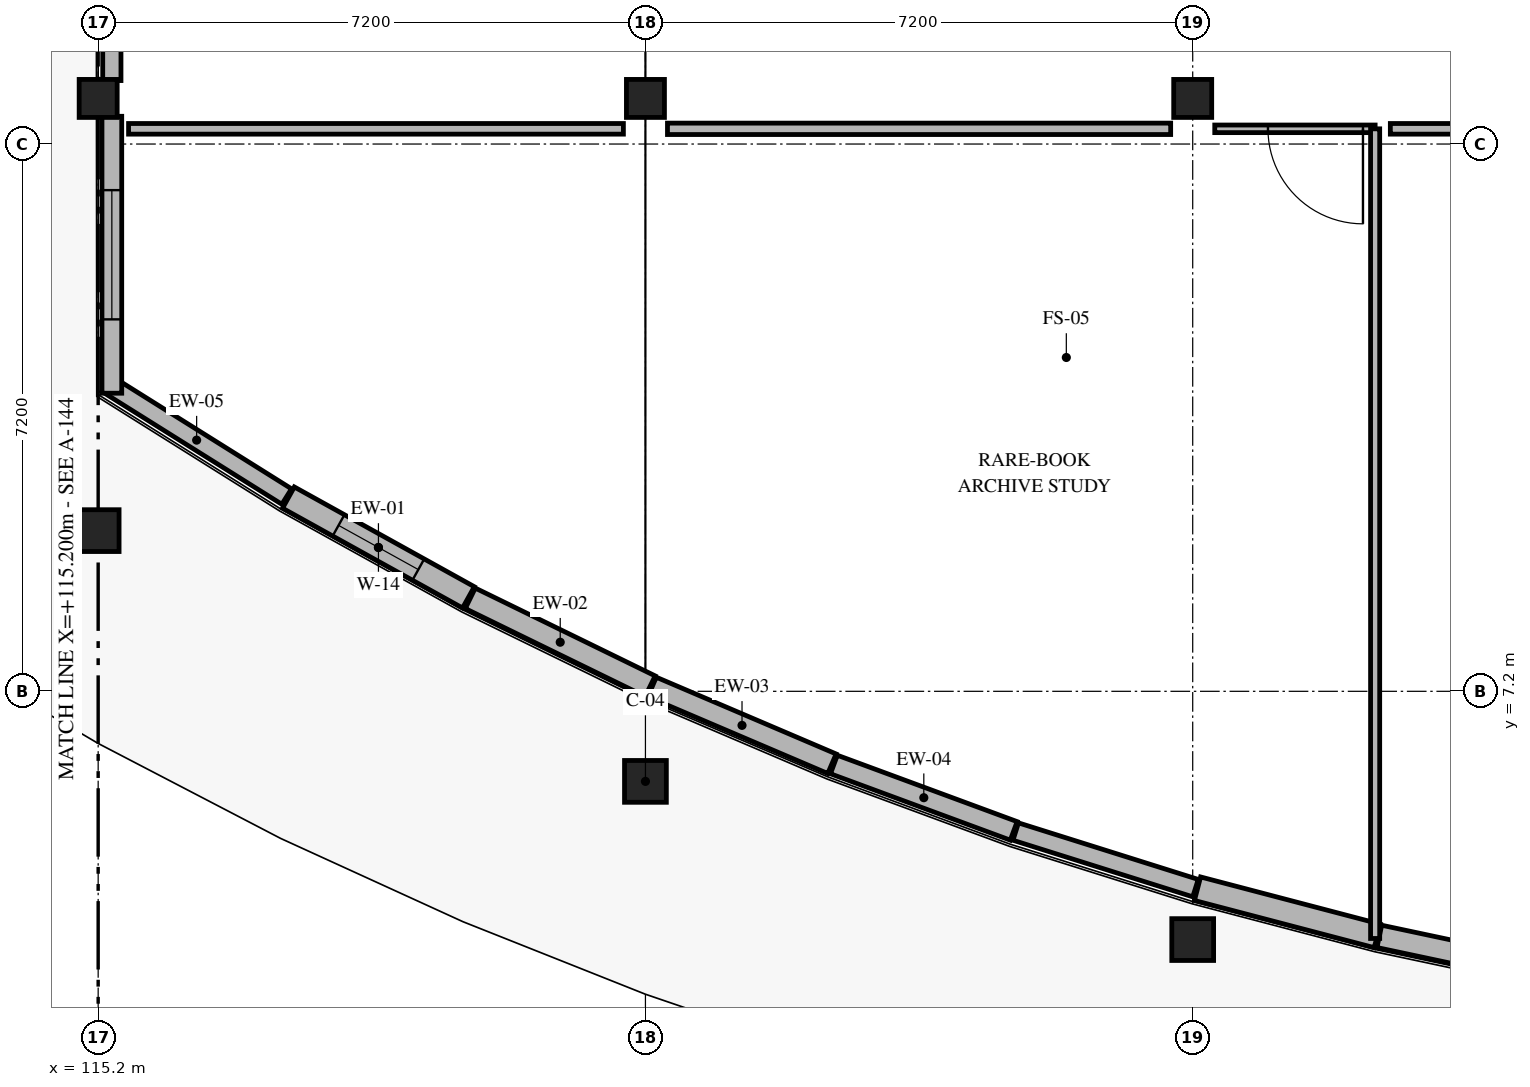
"""IFC4 building model, lengths in metres.
Left out: names, types, materials, properties, quantities, classifications, styles, units other than length and angle.
Written with IfcOpenShell. Run it as: python <this file> out.ifc"""

import sys

from ifc_helpers import new_model, si_unit, direction, frame, frame_2d, origin, origin_2d, place, context, subcontext, project, spatial, rectangle, extrude, element, fill, save


model = new_model("IFC4")
c1 = context("Model", 3, precision=1e-05, world=origin(), true_north=direction((0.0, 1.0)))
c2 = subcontext(c1, "Body", "Model", "MODEL_VIEW")
j1 = project(units=[si_unit("LENGTHUNIT", "METRE"), si_unit("PLANEANGLEUNIT", "RADIAN")], contexts=[c1])
p1 = place(None, origin())
s1 = spatial("IfcSite", under=j1, at=p1, CompositionType="ELEMENT")
p2 = place(p1, origin())
s2 = spatial("IfcBuilding", under=s1, at=p2, CompositionType="ELEMENT")
p3 = place(p2, frame((0.0, 0.0, 20.7)))
s3 = spatial("IfcBuildingStorey", under=s2, at=p3, CompositionType="ELEMENT", Elevation=20.7)
p4 = place(p3, frame((115.2, 9.314, 0.0), z_axis=(0.0, 0.0, 1.0), x_axis=(1.0, 0.0, 0.0)))
e1 = element("IfcColumn", 1, at=p4, inside=s3, PredefinedType="COLUMN", context=c2, shape_type="SweptSolid", body=[
    extrude(rectangle(XDim=0.55, YDim=0.55, at=origin_2d()), origin(), (0.0, 0.0, 1.0), 3.9),
])
p5 = place(p3, frame((115.2, 15.0, 0.0), z_axis=(0.0, 0.0, 1.0), x_axis=(1.0, 0.0, 0.0)))
e2 = element("IfcColumn", 2, at=p5, inside=s3, PredefinedType="COLUMN", context=c2, shape_type="SweptSolid", body=[
    extrude(rectangle(XDim=0.5, YDim=0.5, at=origin_2d()), origin(), (0.0, 0.0, 1.0), 3.9),
])
p6 = place(p3, frame((122.4, 6.015, 0.0), z_axis=(0.0, 0.0, 1.0), x_axis=(1.0, 0.0, 0.0)))
e3 = element("IfcColumn", 3, at=p6, inside=s3, PredefinedType="COLUMN", context=c2, shape_type="SweptSolid", body=[
    extrude(rectangle(XDim=0.55, YDim=0.55, at=origin_2d()), origin(), (0.0, 0.0, 1.0), 3.9),
])
p7 = place(p3, frame((122.4, 15.0, 0.0), z_axis=(0.0, 0.0, 1.0), x_axis=(1.0, 0.0, 0.0)))
e4 = element("IfcColumn", 4, at=p7, inside=s3, PredefinedType="COLUMN", context=c2, shape_type="SweptSolid", body=[
    extrude(rectangle(XDim=0.5, YDim=0.5, at=origin_2d()), origin(), (0.0, 0.0, 1.0), 3.9),
])
p8 = place(p3, frame((129.6, 3.934, 0.0), z_axis=(0.0, 0.0, 1.0), x_axis=(1.0, 0.0, 0.0)))
e5 = element("IfcColumn", 5, at=p8, inside=s3, PredefinedType="COLUMN", context=c2, shape_type="SweptSolid", body=[
    extrude(rectangle(XDim=0.55, YDim=0.55, at=origin_2d()), origin(), (0.0, 0.0, 1.0), 3.9),
])
p9 = place(p3, frame((129.6, 15.0, 0.0), z_axis=(0.0, 0.0, 1.0), x_axis=(1.0, 0.0, 0.0)))
e6 = element("IfcColumn", 6, at=p9, inside=s3, PredefinedType="COLUMN", context=c2, shape_type="SweptSolid", body=[
    extrude(rectangle(XDim=0.5, YDim=0.5, at=origin_2d()), origin(), (0.0, 0.0, 1.0), 3.9),
])
p10 = place(p3, frame((117.68, 9.762, 0.0), z_axis=(0.0, 0.0, 1.0), x_axis=(-0.847458290903, 0.530861983174, 0.0)))
e7 = element("IfcWall", 7, at=p10, inside=s3, PredefinedType="SOLIDWALL", context=c2, shape_type="SweptSolid", body=[
    extrude(rectangle(XDim=2.796, YDim=0.24, at=frame_2d((1.398, 0.0))), origin(), (0.0, 0.0, 1.0), 2.86),
])
p11 = place(p3, frame((120.072, 8.436, 0.0), z_axis=(0.0, 0.0, 1.0), x_axis=(-0.874616129919, 0.484816073666, 0.0)))
e8 = element("IfcWall", 8, at=p11, inside=s3, PredefinedType="SOLIDWALL", context=c2, shape_type="SweptSolid", body=[
    extrude(rectangle(XDim=2.708, YDim=0.32, at=frame_2d((1.354, 0.0))), origin(), (0.0, 0.0, 1.0), 3.06),
])
p12 = place(p11, frame((0.754, 0.0, 0.75)))
e9 = element("IfcOpeningElement", 9, at=p12, cuts=e8, PredefinedType="OPENING", context=c2, shape_type="SweptSolid", body=[
    extrude(rectangle(XDim=1.2, YDim=1.5, at=frame_2d((0.6, 0.75))), frame((0.0, 0.17, 0.0), z_axis=(0.0, -1.0, 0.0), x_axis=(1.0, 0.0, 0.0)), (0.0, 0.0, 1.0), 0.34),
])
p13 = place(p3, frame((122.463, 7.268, 0.0), z_axis=(0.0, 0.0, 1.0), x_axis=(-0.898667775588, 0.438629945535, 0.0)))
e10 = element("IfcWall", 10, at=p13, inside=s3, PredefinedType="SOLIDWALL", context=c2, shape_type="SweptSolid", body=[
    extrude(rectangle(XDim=2.634, YDim=0.3, at=frame_2d((1.317, 0.0))), origin(), (0.0, 0.0, 1.0), 2.96),
])
p14 = place(p3, frame((124.854, 6.247, 0.0), z_axis=(0.0, 0.0, 1.0), x_axis=(-0.919781821174, 0.392430123001, 0.0)))
e11 = element("IfcWall", 11, at=p14, inside=s3, PredefinedType="SOLIDWALL", context=c2, shape_type="SweptSolid", body=[
    extrude(rectangle(XDim=2.573, YDim=0.28, at=frame_2d((1.287, 0.0))), origin(), (0.0, 0.0, 1.0), 2.96),
])
p15 = place(p3, frame((127.245, 5.364, 0.0), z_axis=(0.0, 0.0, 1.0), x_axis=(-0.938146303957, 0.346239097117, 0.0)))
e12 = element("IfcWall", 12, at=p15, inside=s3, PredefinedType="SOLIDWALL", context=c2, shape_type="SweptSolid", body=[
    extrude(rectangle(XDim=2.522, YDim=0.26, at=frame_2d((1.261, 0.0))), origin(), (0.0, 0.0, 1.0), 3.06),
])
p16 = place(p3, frame((129.637, 4.611, 0.0), z_axis=(0.0, 0.0, 1.0), x_axis=(-0.953884231724, 0.30017473656, 0.0)))
e13 = element("IfcWall", 13, at=p16, inside=s3, PredefinedType="SOLIDWALL", context=c2, shape_type="SweptSolid", body=[
    extrude(rectangle(XDim=2.48, YDim=0.24, at=frame_2d((1.24, 0.0))), origin(), (0.0, 0.0, 1.0), 3.01),
])
p17 = place(p3, frame((132.028, 3.982, 0.0), z_axis=(0.0, 0.0, 1.0), x_axis=(-0.967257930518, 0.253795381852, 0.0)))
e14 = element("IfcWall", 14, at=p17, inside=s3, PredefinedType="SOLIDWALL", context=c2, shape_type="SweptSolid", body=[
    extrude(rectangle(XDim=2.445, YDim=0.32, at=frame_2d((1.223, 0.0))), origin(), (0.0, 0.0, 1.0), 3.01),
])
p18 = place(p3, frame((134.42, 3.474, 0.0), z_axis=(0.0, 0.0, 1.0), x_axis=(-0.978189380311, 0.207715036162, 0.0)))
e15 = element("IfcWall", 15, at=p18, inside=s3, PredefinedType="SOLIDWALL", context=c2, shape_type="SweptSolid", body=[
    extrude(rectangle(XDim=2.418, YDim=0.3, at=frame_2d((1.209, 0.0))), origin(), (0.0, 0.0, 1.0), 3.06),
])
p19 = place(p3, frame((115.38, 11.122, 0.0), z_axis=(0.0, 0.0, 1.0), x_axis=(0.0, 1.0, 0.0)))
e16 = element("IfcWall", 16, at=p19, inside=s3, PredefinedType="SOLIDWALL", context=c2, shape_type="SweptSolid", body=[
    extrude(rectangle(XDim=3.643, YDim=0.26, at=frame_2d((1.822, 0.0))), origin(), (0.0, 0.0, 1.0), 2.86),
])
p20 = place(p19, frame((0.972, 0.0, 0.9)))
e17 = element("IfcOpeningElement", 17, at=p20, cuts=e16, PredefinedType="OPENING", context=c2, shape_type="SweptSolid", body=[
    extrude(rectangle(XDim=1.7, YDim=0.85, at=frame_2d((0.85, 0.425))), frame((0.0, 0.14, 0.0), z_axis=(0.0, -1.0, 0.0), x_axis=(1.0, 0.0, 0.0)), (0.0, 0.0, 1.0), 0.28),
])
p21 = place(p3, frame((115.38, 15.235, 0.0), z_axis=(0.0, 0.0, 1.0), x_axis=(0.0, 1.0, 0.0)))
e18 = element("IfcWall", 18, at=p21, inside=s3, PredefinedType="SOLIDWALL", context=c2, shape_type="SweptSolid", body=[
    extrude(rectangle(XDim=6.93, YDim=0.24, at=frame_2d((3.465, 0.0))), origin(), (0.0, 0.0, 1.0), 2.86),
])
p22 = place(p21, frame((2.465, 0.0, 0.9)))
e19 = element("IfcOpeningElement", 19, at=p22, cuts=e18, PredefinedType="OPENING", context=c2, shape_type="SweptSolid", body=[
    extrude(rectangle(XDim=2.0, YDim=0.85, at=frame_2d((1.0, 0.425))), frame((0.0, 0.13, 0.0), z_axis=(0.0, -1.0, 0.0), x_axis=(1.0, 0.0, 0.0)), (0.0, 0.0, 1.0), 0.26),
])
p23 = place(p3, frame((132.0, 14.6, 0.0), z_axis=(0.0, 0.0, 1.0), x_axis=(-1.0, 0.0, 0.0)))
e20 = element("IfcWall", 20, at=p23, inside=s3, PredefinedType="PARTITIONING", context=c2, shape_type="SweptSolid", body=[
    extrude(rectangle(XDim=2.11, YDim=0.1, at=frame_2d((1.055, 0.0))), origin(), (0.0, 0.0, 1.0), 3.66),
])
p24 = place(p23, frame((0.16, 0.0, 0.0)))
e21 = element("IfcOpeningElement", 21, at=p24, cuts=e20, PredefinedType="OPENING", context=c2, shape_type="SweptSolid", body=[
    extrude(rectangle(XDim=1.25, YDim=2.2, at=frame_2d((0.625, 1.1))), frame((0.0, 0.06, 0.0), z_axis=(0.0, -1.0, 0.0), x_axis=(1.0, 0.0, 0.0)), (0.0, 0.0, 1.0), 0.12),
])
p25 = place(p3, frame((129.31, 14.6, 0.0), z_axis=(0.0, 0.0, 1.0), x_axis=(-1.0, 0.0, 0.0)))
e22 = element("IfcWall", 22, at=p25, inside=s3, PredefinedType="PARTITIONING", context=c2, shape_type="SweptSolid", body=[
    extrude(rectangle(XDim=6.62, YDim=0.15, at=frame_2d((3.31, 0.0))), origin(), (0.0, 0.0, 1.0), 3.66),
])
p26 = place(p3, frame((122.11, 14.6, 0.0), z_axis=(0.0, 0.0, 1.0), x_axis=(-1.0, 0.0, 0.0)))
e23 = element("IfcWall", 23, at=p26, inside=s3, PredefinedType="PARTITIONING", context=c2, shape_type="SweptSolid", body=[
    extrude(rectangle(XDim=6.51, YDim=0.14, at=frame_2d((3.255, 0.0))), origin(), (0.0, 0.0, 1.0), 3.66),
])
p27 = place(p3, frame((132.0, 3.948, 0.0), z_axis=(0.0, 0.0, 1.0), x_axis=(0.0, 1.0, 0.0)))
e24 = element("IfcWall", 24, at=p27, inside=s3, PredefinedType="PARTITIONING", context=c2, shape_type="SweptSolid", body=[
    extrude(rectangle(XDim=10.652, YDim=0.12, at=frame_2d((5.326, 0.0))), origin(), (0.0, 0.0, 1.0), 3.06),
])
p28 = place(p3, frame((136.51, 14.6, 0.0), z_axis=(0.0, 0.0, 1.0), x_axis=(-1.0, 0.0, 0.0)))
e25 = element("IfcWall", 25, at=p28, inside=s3, PredefinedType="PARTITIONING", context=c2, shape_type="SweptSolid", body=[
    extrude(rectangle(XDim=4.31, YDim=0.14, at=frame_2d((2.155, 0.0))), origin(), (0.0, 0.0, 1.0), 3.66),
])
p29 = place(p12, origin())
e26 = element("IfcWindow", 26, at=p29, inside=s3, PartitioningType="SINGLE_PANEL", PredefinedType="WINDOW", context=c2, shape_type="SweptSolid", body=[
    extrude(rectangle(XDim=1.2, YDim=1.5, at=frame_2d((0.6, 0.75))), frame((0.0, 0.03, 0.0), z_axis=(0.0, -1.0, 0.0), x_axis=(1.0, 0.0, 0.0)), (0.0, 0.0, 1.0), 0.06),
])
fill(e9, e26)
p30 = place(p20, origin())
e27 = element("IfcWindow", 27, at=p30, inside=s3, PartitioningType="SINGLE_PANEL", PredefinedType="WINDOW", context=c2, shape_type="SweptSolid", body=[
    extrude(rectangle(XDim=1.7, YDim=0.85, at=frame_2d((0.85, 0.425))), frame((0.0, 0.03, 0.0), z_axis=(0.0, -1.0, 0.0), x_axis=(1.0, 0.0, 0.0)), (0.0, 0.0, 1.0), 0.06),
])
fill(e17, e27)
p31 = place(p24, origin())
e28 = element("IfcDoor", 28, at=p31, inside=s3, OperationType="SINGLE_SWING_LEFT", PredefinedType="DOOR", context=c2, shape_type="SweptSolid", body=[
    extrude(rectangle(XDim=1.25, YDim=2.2, at=frame_2d((0.625, 1.1))), frame((0.0, 0.025, 0.0), z_axis=(0.0, -1.0, 0.0), x_axis=(1.0, 0.0, 0.0)), (0.0, 0.0, 1.0), 0.05),
])
fill(e21, e28)
save(model, sys.argv[1])
